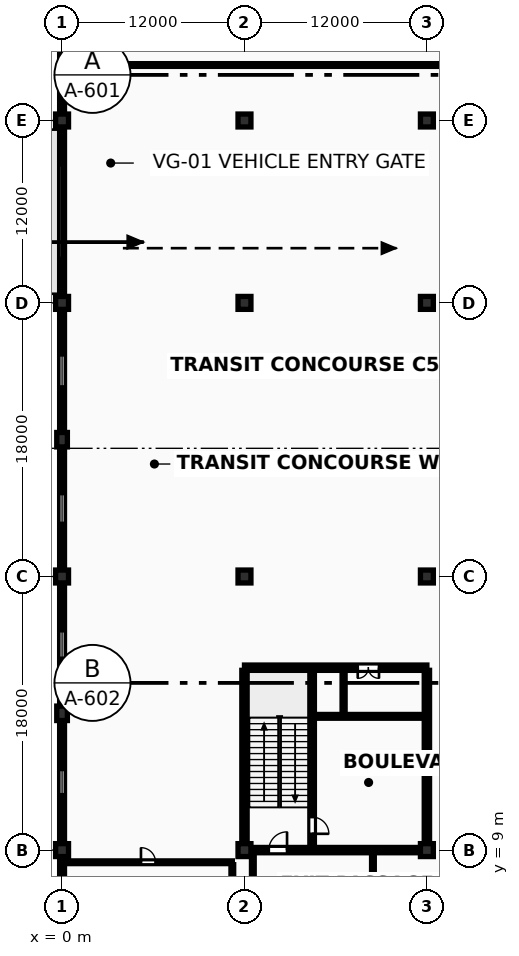
"""IFC4 building model, lengths in metres.
Left out: names, types, materials, properties, quantities, classifications, styles, units other than length and angle.
Written with IfcOpenShell. Run it as: python <this file> out.ifc"""

import sys

from ifc_helpers import new_model, si_unit, direction, frame, frame_2d, origin, origin_2d, place, context, subcontext, project, spatial, rectangle, extrude, element, fill, save


model = new_model("IFC4")
c1 = context("Model", 3, precision=1e-05, world=origin(), true_north=direction((0.0, 1.0)))
c2 = subcontext(c1, "Body", "Model", "MODEL_VIEW")
j1 = project(units=[si_unit("LENGTHUNIT", "METRE"), si_unit("PLANEANGLEUNIT", "RADIAN")], contexts=[c1])
p1 = place(None, origin())
s1 = spatial("IfcSite", under=j1, at=p1, CompositionType="ELEMENT")
p2 = place(p1, origin())
s2 = spatial("IfcBuilding", under=s1, at=p2, CompositionType="ELEMENT")
p3 = place(p2, origin())
s3 = spatial("IfcBuildingStorey", under=s2, at=p3, CompositionType="ELEMENT", Elevation=0.0)
for number, where, z_axis, x_axis in (
    (1, (0.0, 9.0, 0.0), (0.0, 0.0, 1.0), (1.0, 0.0, 0.0)),
    (2, (0.0, 27.0, 0.0), (0.0, 0.0, 1.0), (1.0, 0.0, 0.0)),
    (3, (0.0, 45.0, 0.0), (0.0, 0.0, 1.0), (1.0, 0.0, 0.0)),
    (4, (0.0, 57.0, 0.0), (0.0, 0.0, 1.0), (1.0, 0.0, 0.0)),
    (5, (12.0, 9.0, 0.0), (0.0, 0.0, 1.0), (1.0, 0.0, 0.0)),
    (6, (12.0, 27.0, 0.0), (0.0, 0.0, 1.0), (1.0, 0.0, 0.0)),
    (7, (12.0, 45.0, 0.0), (0.0, 0.0, 1.0), (1.0, 0.0, 0.0)),
    (8, (12.0, 57.0, 0.0), (0.0, 0.0, 1.0), (1.0, 0.0, 0.0)),
    (9, (24.0, 9.0, 0.0), (0.0, 0.0, 1.0), (1.0, 0.0, 0.0)),
    (10, (24.0, 27.0, 0.0), (0.0, 0.0, 1.0), (1.0, 0.0, 0.0)),
    (11, (24.0, 45.0, 0.0), (0.0, 0.0, 1.0), (1.0, 0.0, 0.0)),
    (12, (24.0, 57.0, 0.0), (0.0, 0.0, 1.0), (1.0, 0.0, 0.0)),
):
    element("IfcColumn", number, at=place(p3, frame(where, z_axis=z_axis, x_axis=x_axis)), inside=s3, PredefinedType="COLUMN", context=c2, shape_type="SweptSolid", body=[
        extrude(rectangle(XDim=0.85, YDim=0.85, at=origin_2d()), origin(), (0.0, 0.0, 1.0), 5.4),
    ])
for number, where, z_axis, x_axis in (
    (13, (0.0, 18.0, 0.0), (0.0, 0.0, 1.0), (1.0, 0.0, 0.0)),
    (14, (0.0, 36.0, 0.0), (0.0, 0.0, 1.0), (1.0, 0.0, 0.0)),
):
    element("IfcColumn", number, at=place(p3, frame(where, z_axis=z_axis, x_axis=x_axis)), inside=s3, PredefinedType="PILASTER", context=c2, shape_type="SweptSolid", body=[
        extrude(rectangle(XDim=0.7, YDim=0.95, at=origin_2d()), origin(), (0.0, 0.0, 1.0), 5.4),
    ])
p4 = place(p3, frame((12.422, 9.0, 0.0), z_axis=(0.0, 0.0, 1.0), x_axis=(1.0, 0.0, 0.0)))
e15 = element("IfcWall", 15, at=p4, inside=s3, PredefinedType="SHEAR", context=c2, shape_type="SweptSolid", body=[
    extrude(rectangle(XDim=11.156, YDim=0.35, at=frame_2d((5.578, 0.0))), origin(), (0.0, 0.0, 1.0), 5.203),
])
p5 = place(p4, frame((1.178, 0.0, 0.0)))
e16 = element("IfcOpeningElement", 16, at=p5, cuts=e15, PredefinedType="OPENING", context=c2, shape_type="SweptSolid", body=[
    extrude(rectangle(XDim=1.2, YDim=2.2, at=frame_2d((0.6, 1.1))), frame((0.0, 0.19, 0.0), z_axis=(0.0, -1.0, 0.0), x_axis=(1.0, 0.0, 0.0)), (0.0, 0.0, 1.0), 0.38),
])
p6 = place(p3, frame((12.0, 21.0, 0.0), z_axis=(0.0, 0.0, 1.0), x_axis=(1.0, 0.0, 0.0)))
e17 = element("IfcWall", 17, at=p6, inside=s3, PredefinedType="SHEAR", context=c2, shape_type="SweptSolid", body=[
    extrude(rectangle(XDim=12.0, YDim=0.35, at=frame_2d((6.0, 0.0))), origin(), (0.0, 0.0, 1.0), 5.203),
])
p7 = place(p6, frame((7.45, 0.0, 0.0)))
e18 = element("IfcOpeningElement", 18, at=p7, cuts=e17, PredefinedType="OPENING", context=c2, shape_type="SweptSolid", body=[
    extrude(rectangle(XDim=1.4, YDim=2.22, at=frame_2d((0.7, 1.11))), frame((0.0, 0.19, 0.0), z_axis=(0.0, -1.0, 0.0), x_axis=(1.0, 0.0, 0.0)), (0.0, 0.0, 1.0), 0.38),
])
for number, where, z_axis, x_axis in (
    (19, (12.0, 9.422, 0.0), (0.0, 0.0, 1.0), (0.0, 1.0, 0.0)),
    (20, (24.0, 9.422, 0.0), (0.0, 0.0, 1.0), (0.0, 1.0, 0.0)),
):
    element("IfcWall", number, at=place(p3, frame(where, z_axis=z_axis, x_axis=x_axis)), inside=s3, PredefinedType="SHEAR", context=c2, shape_type="SweptSolid", body=[
        extrude(rectangle(XDim=11.406, YDim=0.35, at=frame_2d((5.703, 0.0))), origin(), (0.0, 0.0, 1.0), 5.203),
    ])
p8 = place(p3, frame((16.45, 9.172, 0.0), z_axis=(0.0, 0.0, 1.0), x_axis=(0.0, 1.0, 0.0)))
e21 = element("IfcWall", 21, at=p8, inside=s3, PredefinedType="SHEAR", context=c2, shape_type="SweptSolid", body=[
    extrude(rectangle(XDim=11.656, YDim=0.3, at=frame_2d((5.828, 0.0))), origin(), (0.0, 0.0, 1.0), 5.203),
])
p9 = place(p8, frame((0.9, 0.0, 0.0)))
e22 = element("IfcOpeningElement", 22, at=p9, cuts=e21, PredefinedType="OPENING", context=c2, shape_type="SweptSolid", body=[
    extrude(rectangle(XDim=1.1, YDim=2.2, at=frame_2d((0.55, 1.1))), frame((0.0, 0.165, 0.0), z_axis=(0.0, -1.0, 0.0), x_axis=(1.0, 0.0, 0.0)), (0.0, 0.0, 1.0), 0.33),
])
p10 = place(p3, frame((16.597, 17.8, 0.0), z_axis=(0.0, 0.0, 1.0), x_axis=(1.0, 0.0, 0.0)))
e23 = element("IfcWall", 23, at=p10, inside=s3, PredefinedType="SOLIDWALL", context=c2, shape_type="SweptSolid", body=[
    extrude(rectangle(XDim=7.231, YDim=0.25, at=frame_2d((3.615, 0.0))), origin(), (0.0, 0.0, 1.0), 5.203),
])
p11 = place(p3, frame((18.52, 17.92, 0.0), z_axis=(0.0, 0.0, 1.0), x_axis=(0.0, 1.0, 0.0)))
e24 = element("IfcWall", 24, at=p11, inside=s3, PredefinedType="SOLIDWALL", context=c2, shape_type="SweptSolid", body=[
    extrude(rectangle(XDim=2.905, YDim=0.2, at=frame_2d((1.453, 0.0))), origin(), (0.0, 0.0, 1.0), 5.193),
])
p12 = place(p3, frame((0.0, 0.423, 0.0), z_axis=(0.0, 0.0, 1.0), x_axis=(0.0, 1.0, 0.0)))
e25 = element("IfcWall", 25, at=p12, inside=s3, PredefinedType="SOLIDWALL", context=c2, shape_type="SweptSolid", body=[
    extrude(rectangle(XDim=8.154, YDim=0.32, at=frame_2d((4.077, 0.0))), origin(), (0.0, 0.0, 1.0), 3.85),
])
p13 = place(p12, frame((3.352, 0.0, 0.55)))
e26 = element("IfcOpeningElement", 26, at=p13, cuts=e25, PredefinedType="OPENING", context=c2, shape_type="SweptSolid", body=[
    extrude(rectangle(XDim=1.45, YDim=1.25, at=frame_2d((0.725, 0.625))), frame((0.0, 0.175, 0.0), z_axis=(0.0, -1.0, 0.0), x_axis=(1.0, 0.0, 0.0)), (0.0, 0.0, 1.0), 0.35),
])
p14 = place(p3, frame((0.0, 9.423, 0.0), z_axis=(0.0, 0.0, 1.0), x_axis=(0.0, 1.0, 0.0)))
e27 = element("IfcWall", 27, at=p14, inside=s3, PredefinedType="SOLIDWALL", context=c2, shape_type="SweptSolid", body=[
    extrude(rectangle(XDim=8.104, YDim=0.32, at=frame_2d((4.052, 0.0))), origin(), (0.0, 0.0, 1.0), 3.85),
])
p15 = place(p14, frame((3.252, 0.0, 0.55)))
e28 = element("IfcOpeningElement", 28, at=p15, cuts=e27, PredefinedType="OPENING", context=c2, shape_type="SweptSolid", body=[
    extrude(rectangle(XDim=1.6, YDim=1.25, at=frame_2d((0.8, 0.625))), frame((0.0, 0.175, 0.0), z_axis=(0.0, -1.0, 0.0), x_axis=(1.0, 0.0, 0.0)), (0.0, 0.0, 1.0), 0.35),
])
p16 = place(p3, frame((0.0, 18.473, 0.0), z_axis=(0.0, 0.0, 1.0), x_axis=(0.0, 1.0, 0.0)))
e29 = element("IfcWall", 29, at=p16, inside=s3, PredefinedType="SOLIDWALL", context=c2, shape_type="SweptSolid", body=[
    extrude(rectangle(XDim=8.104, YDim=0.32, at=frame_2d((4.052, 0.0))), origin(), (0.0, 0.0, 1.0), 3.85),
])
p17 = place(p16, frame((3.177, 0.0, 0.55)))
e30 = element("IfcOpeningElement", 30, at=p17, cuts=e29, PredefinedType="OPENING", context=c2, shape_type="SweptSolid", body=[
    extrude(rectangle(XDim=1.75, YDim=1.25, at=frame_2d((0.875, 0.625))), frame((0.0, 0.175, 0.0), z_axis=(0.0, -1.0, 0.0), x_axis=(1.0, 0.0, 0.0)), (0.0, 0.0, 1.0), 0.35),
])
p18 = place(p3, frame((0.0, 27.423, 0.0), z_axis=(0.0, 0.0, 1.0), x_axis=(0.0, 1.0, 0.0)))
e31 = element("IfcWall", 31, at=p18, inside=s3, PredefinedType="SOLIDWALL", context=c2, shape_type="SweptSolid", body=[
    extrude(rectangle(XDim=8.104, YDim=0.32, at=frame_2d((4.052, 0.0))), origin(), (0.0, 0.0, 1.0), 3.85),
])
p19 = place(p18, frame((3.102, 0.0, 0.55)))
e32 = element("IfcOpeningElement", 32, at=p19, cuts=e31, PredefinedType="OPENING", context=c2, shape_type="SweptSolid", body=[
    extrude(rectangle(XDim=1.9, YDim=1.25, at=frame_2d((0.95, 0.625))), frame((0.0, 0.175, 0.0), z_axis=(0.0, -1.0, 0.0), x_axis=(1.0, 0.0, 0.0)), (0.0, 0.0, 1.0), 0.35),
])
p20 = place(p3, frame((0.0, 36.473, 0.0), z_axis=(0.0, 0.0, 1.0), x_axis=(0.0, 1.0, 0.0)))
e33 = element("IfcWall", 33, at=p20, inside=s3, PredefinedType="SOLIDWALL", context=c2, shape_type="SweptSolid", body=[
    extrude(rectangle(XDim=8.104, YDim=0.32, at=frame_2d((4.052, 0.0))), origin(), (0.0, 0.0, 1.0), 3.85),
])
p21 = place(p20, frame((3.027, 0.0, 0.55)))
e34 = element("IfcOpeningElement", 34, at=p21, cuts=e33, PredefinedType="OPENING", context=c2, shape_type="SweptSolid", body=[
    extrude(rectangle(XDim=2.05, YDim=1.25, at=frame_2d((1.025, 0.625))), frame((0.0, 0.175, 0.0), z_axis=(0.0, -1.0, 0.0), x_axis=(1.0, 0.0, 0.0)), (0.0, 0.0, 1.0), 0.35),
])
p22 = place(p3, frame((0.0, 45.423, 0.0), z_axis=(0.0, 0.0, 1.0), x_axis=(0.0, 1.0, 0.0)))
e35 = element("IfcWall", 35, at=p22, inside=s3, PredefinedType="SOLIDWALL", context=c2, shape_type="SweptSolid", body=[
    extrude(rectangle(XDim=11.154, YDim=0.32, at=frame_2d((5.577, 0.0))), origin(), (0.0, 0.0, 1.0), 3.85),
])
p23 = place(p22, frame((2.577, 0.0, 0.0)))
e36 = element("IfcOpeningElement", 36, at=p23, cuts=e35, PredefinedType="OPENING", context=c2, shape_type="SweptSolid", body=[
    extrude(rectangle(XDim=6.0, YDim=3.2, at=frame_2d((3.0, 1.6))), frame((0.0, 0.175, 0.0), z_axis=(0.0, -1.0, 0.0), x_axis=(1.0, 0.0, 0.0)), (0.0, 0.0, 1.0), 0.35),
])
p24 = place(p3, frame((0.0, 57.423, 0.0), z_axis=(0.0, 0.0, 1.0), x_axis=(0.0, 1.0, 0.0)))
e37 = element("IfcWall", 37, at=p24, inside=s3, PredefinedType="SOLIDWALL", context=c2, shape_type="SweptSolid", body=[
    extrude(rectangle(XDim=11.154, YDim=0.32, at=frame_2d((5.577, 0.0))), origin(), (0.0, 0.0, 1.0), 3.85),
])
p25 = place(p24, frame((4.537, 0.0, 0.0)))
e38 = element("IfcOpeningElement", 38, at=p25, cuts=e37, PredefinedType="OPENING", context=c2, shape_type="SweptSolid", body=[
    extrude(rectangle(XDim=2.08, YDim=2.44, at=frame_2d((1.04, 1.22))), frame((0.0, 0.175, 0.0), z_axis=(0.0, -1.0, 0.0), x_axis=(1.0, 0.0, 0.0)), (0.0, 0.0, 1.0), 0.35),
])
p26 = place(p3, frame((0.14, 8.2, 0.0), z_axis=(0.0, 0.0, 1.0), x_axis=(1.0, 0.0, 0.0)))
e39 = element("IfcWall", 39, at=p26, inside=s3, PredefinedType="SOLIDWALL", context=c2, shape_type="SweptSolid", body=[
    extrude(rectangle(XDim=11.06, YDim=0.18, at=frame_2d((5.53, 0.0))), origin(), (0.0, 0.0, 1.0), 2.75),
])
p27 = place(p26, frame((5.05, 0.0, 0.0)))
e40 = element("IfcOpeningElement", 40, at=p27, cuts=e39, PredefinedType="OPENING", context=c2, shape_type="SweptSolid", body=[
    extrude(rectangle(XDim=0.96, YDim=2.12, at=frame_2d((0.48, 1.06))), frame((0.0, 0.105, 0.0), z_axis=(0.0, -1.0, 0.0), x_axis=(1.0, 0.0, 0.0)), (0.0, 0.0, 1.0), 0.21),
])
p28 = place(p3, frame((11.2, 0.14, 0.0), z_axis=(0.0, 0.0, 1.0), x_axis=(0.0, 1.0, 0.0)))
e41 = element("IfcWall", 41, at=p28, inside=s3, PredefinedType="SOLIDWALL", context=c2, shape_type="SweptSolid", body=[
    extrude(rectangle(XDim=7.9, YDim=0.18, at=frame_2d((3.95, 0.0))), origin(), (0.0, 0.0, 1.0), 2.75),
])
p29 = place(p3, frame((0.4, 60.65, 0.0), z_axis=(0.0, 0.0, 1.0), x_axis=(1.0, 0.0, 0.0)))
e42 = element("IfcWall", 42, at=p29, inside=s3, PredefinedType="SOLIDWALL", context=c2, shape_type="SweptSolid", body=[
    extrude(rectangle(XDim=47.3, YDim=0.18, at=frame_2d((23.65, 0.0))), origin(), (0.0, 0.0, 1.0), 2.6),
])
p30 = place(p29, frame((29.0, 0.0, 0.0)))
e43 = element("IfcOpeningElement", 43, at=p30, cuts=e42, PredefinedType="OPENING", context=c2, shape_type="SweptSolid", body=[
    extrude(rectangle(XDim=1.2, YDim=2.2, at=frame_2d((0.6, 1.1))), frame((0.0, 0.105, 0.0), z_axis=(0.0, -1.0, 0.0), x_axis=(1.0, 0.0, 0.0)), (0.0, 0.0, 1.0), 0.21),
])
p31 = place(p3, frame((12.55, 0.4, 0.0), z_axis=(0.0, 0.0, 1.0), x_axis=(0.0, 1.0, 0.0)))
e44 = element("IfcWall", 44, at=p31, inside=s3, PredefinedType="SOLIDWALL", context=c2, shape_type="SweptSolid", body=[
    extrude(rectangle(XDim=8.3, YDim=0.18, at=frame_2d((4.15, 0.0))), origin(), (0.0, 0.0, 1.0), 2.6),
])
p32 = place(p3, frame((20.45, 0.4, 0.0), z_axis=(0.0, 0.0, 1.0), x_axis=(0.0, 1.0, 0.0)))
e45 = element("IfcWall", 45, at=p32, inside=s3, PredefinedType="SOLIDWALL", context=c2, shape_type="SweptSolid", body=[
    extrude(rectangle(XDim=8.3, YDim=0.18, at=frame_2d((4.15, 0.0))), origin(), (0.0, 0.0, 1.0), 2.6),
])
p33 = place(p32, frame((3.5, 0.0, 0.0)))
e46 = element("IfcOpeningElement", 46, at=p33, cuts=e45, PredefinedType="OPENING", context=c2, shape_type="SweptSolid", body=[
    extrude(rectangle(XDim=1.2, YDim=2.2, at=frame_2d((0.6, 1.1))), frame((0.0, 0.105, 0.0), z_axis=(0.0, -1.0, 0.0), x_axis=(1.0, 0.0, 0.0)), (0.0, 0.0, 1.0), 0.21),
])
p34 = place(p15, origin())
e47 = element("IfcWindow", 47, at=p34, inside=s3, PartitioningType="SINGLE_PANEL", PredefinedType="WINDOW", context=c2, shape_type="SweptSolid", body=[
    extrude(rectangle(XDim=1.6, YDim=1.25, at=frame_2d((0.8, 0.625))), frame((0.0, 0.03, 0.0), z_axis=(0.0, -1.0, 0.0), x_axis=(1.0, 0.0, 0.0)), (0.0, 0.0, 1.0), 0.06),
])
fill(e28, e47)
p35 = place(p17, origin())
e48 = element("IfcWindow", 48, at=p35, inside=s3, PartitioningType="SINGLE_PANEL", PredefinedType="WINDOW", context=c2, shape_type="SweptSolid", body=[
    extrude(rectangle(XDim=1.75, YDim=1.25, at=frame_2d((0.875, 0.625))), frame((0.0, 0.03, 0.0), z_axis=(0.0, -1.0, 0.0), x_axis=(1.0, 0.0, 0.0)), (0.0, 0.0, 1.0), 0.06),
])
fill(e30, e48)
p36 = place(p19, origin())
e49 = element("IfcWindow", 49, at=p36, inside=s3, PartitioningType="DOUBLE_PANEL_VERTICAL", PredefinedType="WINDOW", context=c2, shape_type="SweptSolid", body=[
    extrude(rectangle(XDim=1.9, YDim=1.25, at=frame_2d((0.95, 0.625))), frame((0.0, 0.03, 0.0), z_axis=(0.0, -1.0, 0.0), x_axis=(1.0, 0.0, 0.0)), (0.0, 0.0, 1.0), 0.06),
])
fill(e32, e49)
p37 = place(p21, origin())
e50 = element("IfcWindow", 50, at=p37, inside=s3, PartitioningType="DOUBLE_PANEL_VERTICAL", PredefinedType="WINDOW", context=c2, shape_type="SweptSolid", body=[
    extrude(rectangle(XDim=2.05, YDim=1.25, at=frame_2d((1.025, 0.625))), frame((0.0, 0.03, 0.0), z_axis=(0.0, -1.0, 0.0), x_axis=(1.0, 0.0, 0.0)), (0.0, 0.0, 1.0), 0.06),
])
fill(e34, e50)
p38 = place(p23, origin())
e51 = element("IfcDoor", 51, at=p38, inside=s3, OperationType="DOUBLE_DOOR_SLIDING", PredefinedType="GATE", context=c2, shape_type="SweptSolid", body=[
    extrude(rectangle(XDim=6.0, YDim=3.2, at=frame_2d((3.0, 1.6))), frame((0.0, 0.025, 0.0), z_axis=(0.0, -1.0, 0.0), x_axis=(1.0, 0.0, 0.0)), (0.0, 0.0, 1.0), 0.05),
])
fill(e36, e51)
p39 = place(p9, origin())
e52 = element("IfcDoor", 52, at=p39, inside=s3, OperationType="SINGLE_SWING_LEFT", PredefinedType="DOOR", context=c2, shape_type="SweptSolid", body=[
    extrude(rectangle(XDim=1.1, YDim=2.2, at=frame_2d((0.55, 1.1))), frame((0.0, 0.025, 0.0), z_axis=(0.0, -1.0, 0.0), x_axis=(1.0, 0.0, 0.0)), (0.0, 0.0, 1.0), 0.05),
])
fill(e22, e52)
p40 = place(p7, origin())
e53 = element("IfcDoor", 53, at=p40, inside=s3, OperationType="DOUBLE_DOOR_SINGLE_SWING", PredefinedType="DOOR", context=c2, shape_type="SweptSolid", body=[
    extrude(rectangle(XDim=1.4, YDim=2.22, at=frame_2d((0.7, 1.11))), frame((0.0, 0.025, 0.0), z_axis=(0.0, -1.0, 0.0), x_axis=(1.0, 0.0, 0.0)), (0.0, 0.0, 1.0), 0.05),
])
fill(e18, e53)
p41 = place(p5, frame((1.2, 0.0, 0.0), z_axis=(0.0, 0.0, 1.0), x_axis=(-1.0, 0.0, 0.0)))
e54 = element("IfcDoor", 54, at=p41, inside=s3, OperationType="SINGLE_SWING_RIGHT", PredefinedType="DOOR", context=c2, shape_type="SweptSolid", body=[
    extrude(rectangle(XDim=1.2, YDim=2.2, at=frame_2d((0.6, 1.1))), frame((0.0, 0.025, 0.0), z_axis=(0.0, -1.0, 0.0), x_axis=(1.0, 0.0, 0.0)), (0.0, 0.0, 1.0), 0.05),
])
fill(e16, e54)
p42 = place(p27, origin())
e55 = element("IfcDoor", 55, at=p42, inside=s3, OperationType="SINGLE_SWING_LEFT", PredefinedType="DOOR", context=c2, shape_type="SweptSolid", body=[
    extrude(rectangle(XDim=0.96, YDim=2.12, at=frame_2d((0.48, 1.06))), frame((0.0, 0.025, 0.0), z_axis=(0.0, -1.0, 0.0), x_axis=(1.0, 0.0, 0.0)), (0.0, 0.0, 1.0), 0.05),
])
fill(e40, e55)
save(model, sys.argv[1])
